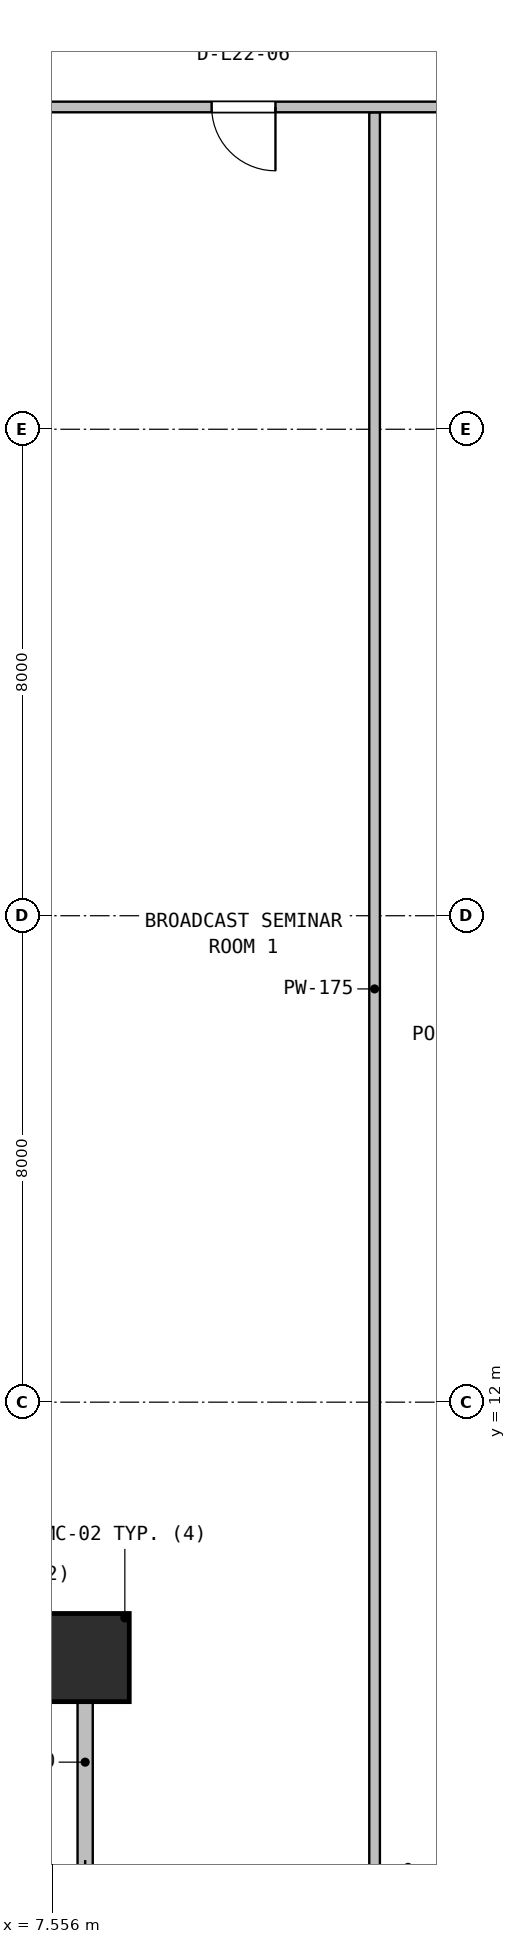
"""IFC4 building model, lengths in metres.
Left out: names, types, materials, properties, quantities, classifications, styles, units other than length and angle.
Written with IfcOpenShell. Run it as: python <this file> out.ifc"""

import sys

from ifc_helpers import new_model, si_unit, direction, frame, frame_2d, origin, origin_2d, place, context, subcontext, project, spatial, rectangle, hollow_rectangle, extrude, source, transform, mapped, element, fill, save


model = new_model("IFC4")
c1 = context("Model", 3, precision=1e-05, world=origin(), true_north=direction((0.0, 1.0)))
c2 = subcontext(c1, "Body", "Model", "MODEL_VIEW")
j1 = project(units=[si_unit("LENGTHUNIT", "METRE"), si_unit("PLANEANGLEUNIT", "RADIAN")], contexts=[c1])
p1 = place(None, origin())
s1 = spatial("IfcSite", under=j1, at=p1, CompositionType="ELEMENT")
p2 = place(p1, origin())
s2 = spatial("IfcBuilding", under=s1, at=p2, CompositionType="ELEMENT")
p3 = place(p2, frame((0.0, 0.0, 94.6)))
s3 = spatial("IfcBuildingStorey", under=s2, at=p3, CompositionType="ELEMENT", Elevation=94.6)
m1 = source(origin(), c2, "Body", "SweptSolid", [
    extrude(hollow_rectangle(XDim=1.45, YDim=1.45, WallThickness=0.055, at=origin_2d()), origin(), (0.0, 0.0, 1.0), 3.8),
])
p4 = place(p3, frame((8.1, 7.8, 0.0), z_axis=(0.0, 0.0, 1.0), x_axis=(1.0, 0.0, 0.0)))
e1 = element("IfcColumn", 1, at=p4, inside=s3, PredefinedType="COLUMN", context=c2, shape_type="MappedRepresentation", body=[
    mapped(m1, transform((0.0, 0.0, 0.0), x_axis=(1.0, 0.0, 0.0), y_axis=(0.0, 1.0, 0.0), z_axis=(0.0, 0.0, 1.0), scale=1.0)),
])
p5 = place(p3, frame((8.1, 4.28, 0.0), z_axis=(0.0, 0.0, 1.0), x_axis=(0.0, 1.0, 0.0)))
e2 = element("IfcWall", 2, at=p5, inside=s3, PredefinedType="SOLIDWALL", context=c2, shape_type="SweptSolid", body=[
    extrude(rectangle(XDim=3.6, YDim=0.25, at=frame_2d((1.8, 0.0))), origin(), (0.0, 0.0, 1.0), 3.078),
])
p6 = place(p3, frame((12.86, 4.38, 0.0), z_axis=(0.0, 0.0, 1.0), x_axis=(0.0, 1.0, 0.0)))
e3 = element("IfcWall", 3, at=p6, inside=s3, PredefinedType="PARTITIONING", context=c2, shape_type="SweptSolid", body=[
    extrude(rectangle(XDim=28.832, YDim=0.175, at=frame_2d((14.416, 0.0))), origin(), (0.0, 0.0, 1.0), 3.078),
])
p7 = place(p3, frame((4.68, 33.3, 0.0), z_axis=(0.0, 0.0, 1.0), x_axis=(1.0, 0.0, 0.0)))
e4 = element("IfcWall", 4, at=p7, inside=s3, PredefinedType="PARTITIONING", context=c2, shape_type="SweptSolid", body=[
    extrude(rectangle(XDim=21.49, YDim=0.175, at=frame_2d((10.745, 0.0))), origin(), (0.0, 0.0, 1.0), 2.8),
])
p8 = place(p7, frame((5.5, 0.0, 0.0)))
e5 = element("IfcOpeningElement", 5, at=p8, cuts=e4, PredefinedType="OPENING", context=c2, shape_type="SweptSolid", body=[
    extrude(rectangle(XDim=1.05, YDim=2.1, at=frame_2d((0.525, 1.05))), frame((0.0, 0.098, 0.0), z_axis=(0.0, -1.0, 0.0), x_axis=(1.0, 0.0, 0.0)), (0.0, 0.0, 1.0), 0.195),
])
p9 = place(p7, frame((10.39, 0.0, 0.0)))
e6 = element("IfcOpeningElement", 6, at=p9, cuts=e4, PredefinedType="OPENING", context=c2, shape_type="SweptSolid", body=[
    extrude(rectangle(XDim=1.4, YDim=2.12, at=frame_2d((0.7, 1.06))), frame((0.0, 0.098, 0.0), z_axis=(0.0, -1.0, 0.0), x_axis=(1.0, 0.0, 0.0)), (0.0, 0.0, 1.0), 0.195),
])
p10 = place(p7, frame((14.795, 0.0, 0.0)))
e7 = element("IfcOpeningElement", 7, at=p10, cuts=e4, PredefinedType="OPENING", context=c2, shape_type="SweptSolid", body=[
    extrude(rectangle(XDim=1.4, YDim=2.12, at=frame_2d((0.7, 1.06))), frame((0.0, 0.098, 0.0), z_axis=(0.0, -1.0, 0.0), x_axis=(1.0, 0.0, 0.0)), (0.0, 0.0, 1.0), 0.195),
])
m2 = source(origin(), c2, "Body", "SweptSolid", [
    extrude(rectangle(XDim=1.05, YDim=2.1, at=frame_2d((0.525, 1.05))), frame((0.0, 0.025, 0.0), z_axis=(0.0, -1.0, 0.0), x_axis=(1.0, 0.0, 0.0)), (0.0, 0.0, 1.0), 0.05),
])
p11 = place(p8, frame((1.05, 0.0, 0.0), z_axis=(0.0, 0.0, 1.0), x_axis=(-1.0, 0.0, 0.0)))
e8 = element("IfcDoor", 8, at=p11, inside=s3, OperationType="SINGLE_SWING_RIGHT", PredefinedType="DOOR", context=c2, shape_type="MappedRepresentation", body=[
    mapped(m2, transform((0.0, 0.0, 0.0), x_axis=(1.0, 0.0, 0.0), y_axis=(0.0, 1.0, 0.0), z_axis=(0.0, 0.0, 1.0), scale=1.0)),
])
fill(e5, e8)
save(model, sys.argv[1])
